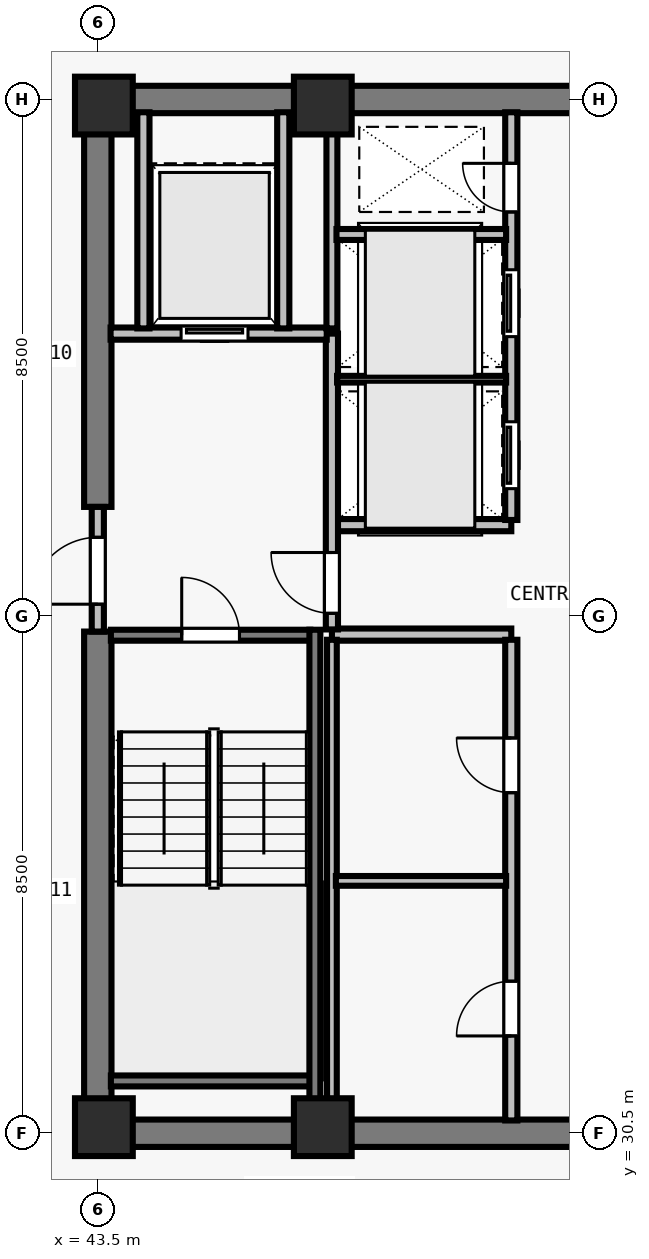
"""IFC4 building model, lengths in metres.
Left out: names, types, materials, properties, quantities, classifications, styles, units other than length and angle.
Written with IfcOpenShell. Run it as: python <this file> out.ifc"""

import sys

from ifc_helpers import new_model, si_unit, direction, frame, frame_2d, origin, origin_2d, place, context, subcontext, project, spatial, rectangle, extrude, element, fill, save


model = new_model("IFC4")
c1 = context("Model", 3, precision=1e-05, world=origin(), true_north=direction((0.0, 1.0)))
c2 = subcontext(c1, "Body", "Model", "MODEL_VIEW")
j1 = project(units=[si_unit("LENGTHUNIT", "METRE"), si_unit("PLANEANGLEUNIT", "RADIAN")], contexts=[c1])
p1 = place(None, origin())
s1 = spatial("IfcSite", under=j1, at=p1, CompositionType="ELEMENT")
p2 = place(p1, origin())
s2 = spatial("IfcBuilding", under=s1, at=p2, CompositionType="ELEMENT")
p3 = place(p2, frame((0.0, 0.0, 213.0)))
s3 = spatial("IfcBuildingStorey", under=s2, at=p3, CompositionType="ELEMENT", Elevation=213.0)
for number, where, z_axis, x_axis in (
    (1, (43.6, 30.6, 0.0), (0.0, 0.0, 1.0), (1.0, 0.0, 0.0)),
    (2, (47.2, 30.6, 0.0), (0.0, 0.0, 1.0), (1.0, 0.0, 0.0)),
    (3, (43.6, 47.4, 0.0), (0.0, 0.0, 1.0), (1.0, 0.0, 0.0)),
    (4, (47.2, 47.4, 0.0), (0.0, 0.0, 1.0), (1.0, 0.0, 0.0)),
):
    element("IfcColumn", number, at=place(p3, frame(where, z_axis=z_axis, x_axis=x_axis)), inside=s3, PredefinedType="COLUMN", context=c2, shape_type="SweptSolid", body=[
        extrude(rectangle(XDim=0.95, YDim=0.95, at=origin_2d()), origin(), (0.0, 0.0, 1.0), 3.5),
    ])
for number, where, z_axis, x_axis in (
    (5, (43.275, 30.5, 0.0), (0.0, 0.0, 1.0), (1.0, 0.0, 0.0)),
    (6, (43.275, 47.5, 0.0), (0.0, 0.0, 1.0), (1.0, 0.0, 0.0)),
):
    element("IfcWall", number, at=place(p3, frame(where, z_axis=z_axis, x_axis=x_axis)), inside=s3, PredefinedType="SHEAR", context=c2, shape_type="SweptSolid", body=[
        extrude(rectangle(XDim=17.45, YDim=0.45, at=frame_2d((8.725, 0.0))), origin(), (0.0, 0.0, 1.0), 3.29),
    ])
p4 = place(p3, frame((43.5, 30.715, 0.0), z_axis=(0.0, 0.0, 1.0), x_axis=(0.0, 1.0, 0.0)))
e7 = element("IfcWall", 7, at=p4, inside=s3, PredefinedType="SHEAR", context=c2, shape_type="SweptSolid", body=[
    extrude(rectangle(XDim=8.035, YDim=0.45, at=frame_2d((4.018, 0.0))), origin(), (0.0, 0.0, 1.0), 3.29),
])
p5 = place(p3, frame((43.5, 40.8, 0.0), z_axis=(0.0, 0.0, 1.0), x_axis=(0.0, 1.0, 0.0)))
e8 = element("IfcWall", 8, at=p5, inside=s3, PredefinedType="SHEAR", context=c2, shape_type="SweptSolid", body=[
    extrude(rectangle(XDim=6.485, YDim=0.45, at=frame_2d((3.242, 0.0))), origin(), (0.0, 0.0, 1.0), 3.29),
])
for number, where, z_axis, x_axis in (
    (9, (47.35, 38.7, 0.0), (0.0, 0.0, 1.0), (1.0, 0.0, 0.0)),
    (10, (47.35, 40.5, 0.0), (0.0, 0.0, 1.0), (1.0, 0.0, 0.0)),
):
    element("IfcWall", number, at=place(p3, frame(where, z_axis=z_axis, x_axis=x_axis)), inside=s3, PredefinedType="SOLIDWALL", context=c2, shape_type="SweptSolid", body=[
        extrude(rectangle(XDim=2.95, YDim=0.2, at=frame_2d((1.475, 0.0))), origin(), (0.0, 0.0, 1.0), 3.29),
    ])
p6 = place(p3, frame((50.3, 30.71, 0.0), z_axis=(0.0, 0.0, 1.0), x_axis=(0.0, 1.0, 0.0)))
e11 = element("IfcWall", 11, at=p6, inside=s3, PredefinedType="SOLIDWALL", context=c2, shape_type="SweptSolid", body=[
    extrude(rectangle(XDim=7.905, YDim=0.2, at=frame_2d((3.953, 0.0))), origin(), (0.0, 0.0, 1.0), 3.29),
])
p7 = place(p6, frame((1.39, 0.0, 0.0)))
e12 = element("IfcOpeningElement", 12, at=p7, cuts=e11, PredefinedType="OPENING", context=c2, shape_type="SweptSolid", body=[
    extrude(rectangle(XDim=0.9, YDim=2.12, at=frame_2d((0.45, 1.06))), frame((0.0, 0.11, 0.0), z_axis=(0.0, -1.0, 0.0), x_axis=(1.0, 0.0, 0.0)), (0.0, 0.0, 1.0), 0.22),
])
p8 = place(p6, frame((5.39, 0.0, 0.0)))
e13 = element("IfcOpeningElement", 13, at=p8, cuts=e11, PredefinedType="OPENING", context=c2, shape_type="SweptSolid", body=[
    extrude(rectangle(XDim=0.9, YDim=2.12, at=frame_2d((0.45, 1.06))), frame((0.0, 0.11, 0.0), z_axis=(0.0, -1.0, 0.0), x_axis=(1.0, 0.0, 0.0)), (0.0, 0.0, 1.0), 0.22),
])
p9 = place(p3, frame((50.3, 40.585, 0.0), z_axis=(0.0, 0.0, 1.0), x_axis=(0.0, 1.0, 0.0)))
e14 = element("IfcWall", 14, at=p9, inside=s3, PredefinedType="SOLIDWALL", context=c2, shape_type="SweptSolid", body=[
    extrude(rectangle(XDim=6.705, YDim=0.2, at=frame_2d((3.353, 0.0))), origin(), (0.0, 0.0, 1.0), 3.29),
])
p10 = place(p9, frame((0.515, 0.0, 0.0)))
e15 = element("IfcOpeningElement", 15, at=p10, cuts=e14, PredefinedType="OPENING", context=c2, shape_type="SweptSolid", body=[
    extrude(rectangle(XDim=1.1, YDim=2.2, at=frame_2d((0.55, 1.1))), frame((0.0, 0.11, 0.0), z_axis=(0.0, -1.0, 0.0), x_axis=(1.0, 0.0, 0.0)), (0.0, 0.0, 1.0), 0.22),
])
p11 = place(p9, frame((3.015, 0.0, 0.0)))
e16 = element("IfcOpeningElement", 16, at=p11, cuts=e14, PredefinedType="OPENING", context=c2, shape_type="SweptSolid", body=[
    extrude(rectangle(XDim=1.1, YDim=2.2, at=frame_2d((0.55, 1.1))), frame((0.0, 0.11, 0.0), z_axis=(0.0, -1.0, 0.0), x_axis=(1.0, 0.0, 0.0)), (0.0, 0.0, 1.0), 0.22),
])
p12 = place(p9, frame((5.065, 0.0, 0.0)))
e17 = element("IfcOpeningElement", 17, at=p12, cuts=e14, PredefinedType="OPENING", context=c2, shape_type="SweptSolid", body=[
    extrude(rectangle(XDim=0.8, YDim=2.08, at=frame_2d((0.4, 1.04))), frame((0.0, 0.11, 0.0), z_axis=(0.0, -1.0, 0.0), x_axis=(1.0, 0.0, 0.0)), (0.0, 0.0, 1.0), 0.22),
])
p13 = place(p3, frame((43.5, 38.75, 0.0), z_axis=(0.0, 0.0, 1.0), x_axis=(0.0, 1.0, 0.0)))
e18 = element("IfcWall", 18, at=p13, inside=s3, PredefinedType="SOLIDWALL", context=c2, shape_type="SweptSolid", body=[
    extrude(rectangle(XDim=2.05, YDim=0.2, at=frame_2d((1.025, 0.0))), origin(), (0.0, 0.0, 1.0), 3.29),
])
p14 = place(p13, frame((0.45, 0.0, 0.0)))
e19 = element("IfcOpeningElement", 19, at=p14, cuts=e18, PredefinedType="OPENING", context=c2, shape_type="SweptSolid", body=[
    extrude(rectangle(XDim=1.1, YDim=2.15, at=frame_2d((0.55, 1.075))), frame((0.0, 0.11, 0.0), z_axis=(0.0, -1.0, 0.0), x_axis=(1.0, 0.0, 0.0)), (0.0, 0.0, 1.0), 0.22),
])
p15 = place(p3, frame((47.35, 38.785, 0.0), z_axis=(0.0, 0.0, 1.0), x_axis=(0.0, 1.0, 0.0)))
e20 = element("IfcWall", 20, at=p15, inside=s3, PredefinedType="SOLIDWALL", context=c2, shape_type="SweptSolid", body=[
    extrude(rectangle(XDim=4.865, YDim=0.2, at=frame_2d((2.433, 0.0))), origin(), (0.0, 0.0, 1.0), 3.29),
])
p16 = place(p15, frame((0.265, 0.0, 0.0)))
e21 = element("IfcOpeningElement", 21, at=p16, cuts=e20, PredefinedType="OPENING", context=c2, shape_type="SweptSolid", body=[
    extrude(rectangle(XDim=1.0, YDim=2.15, at=frame_2d((0.5, 1.075))), frame((0.0, 0.11, 0.0), z_axis=(0.0, -1.0, 0.0), x_axis=(1.0, 0.0, 0.0)), (0.0, 0.0, 1.0), 0.22),
])
p17 = place(p3, frame((43.71, 43.65, 0.0), z_axis=(0.0, 0.0, 1.0), x_axis=(1.0, 0.0, 0.0)))
e22 = element("IfcWall", 22, at=p17, inside=s3, PredefinedType="SOLIDWALL", context=c2, shape_type="SweptSolid", body=[
    extrude(rectangle(XDim=3.555, YDim=0.2, at=frame_2d((1.777, 0.0))), origin(), (0.0, 0.0, 1.0), 3.29),
])
p18 = place(p17, frame((1.16, 0.0, 0.0)))
e23 = element("IfcOpeningElement", 23, at=p18, cuts=e22, PredefinedType="OPENING", context=c2, shape_type="SweptSolid", body=[
    extrude(rectangle(XDim=1.1, YDim=2.2, at=frame_2d((0.55, 1.1))), frame((0.0, 0.11, 0.0), z_axis=(0.0, -1.0, 0.0), x_axis=(1.0, 0.0, 0.0)), (0.0, 0.0, 1.0), 0.22),
])
for number, where, z_axis, x_axis in (
    (24, (46.55, 43.735, 0.0), (0.0, 0.0, 1.0), (0.0, 1.0, 0.0)),
    (25, (44.25, 43.735, 0.0), (0.0, 0.0, 1.0), (0.0, 1.0, 0.0)),
):
    element("IfcWall", number, at=place(p3, frame(where, z_axis=z_axis, x_axis=x_axis)), inside=s3, PredefinedType="SOLIDWALL", context=c2, shape_type="SweptSolid", body=[
        extrude(rectangle(XDim=3.555, YDim=0.2, at=frame_2d((1.777, 0.0))), origin(), (0.0, 0.0, 1.0), 3.29),
    ])
p19 = place(p3, frame((47.35, 30.71, 0.0), z_axis=(0.0, 0.0, 1.0), x_axis=(0.0, 1.0, 0.0)))
e26 = element("IfcWall", 26, at=p19, inside=s3, PredefinedType="PARTITIONING", context=c2, shape_type="SweptSolid", body=[
    extrude(rectangle(XDim=7.905, YDim=0.16, at=frame_2d((3.953, 0.0))), origin(), (0.0, 0.0, 1.0), 3.29),
])
p20 = place(p3, frame((47.415, 34.65, 0.0), z_axis=(0.0, 0.0, 1.0), x_axis=(1.0, 0.0, 0.0)))
e27 = element("IfcWall", 27, at=p20, inside=s3, PredefinedType="PARTITIONING", context=c2, shape_type="SweptSolid", body=[
    extrude(rectangle(XDim=2.8, YDim=0.16, at=frame_2d((1.4, 0.0))), origin(), (0.0, 0.0, 1.0), 3.29),
])
p21 = place(p3, frame((47.35, 43.735, 0.0), z_axis=(0.0, 0.0, 1.0), x_axis=(0.0, 1.0, 0.0)))
e28 = element("IfcWall", 28, at=p21, inside=s3, PredefinedType="SOLIDWALL", context=c2, shape_type="SweptSolid", body=[
    extrude(rectangle(XDim=3.555, YDim=0.18, at=frame_2d((1.777, 0.0))), origin(), (0.0, 0.0, 1.0), 3.29),
])
p22 = place(p3, frame((47.435, 42.9, 0.0), z_axis=(0.0, 0.0, 1.0), x_axis=(1.0, 0.0, 0.0)))
e29 = element("IfcWall", 29, at=p22, inside=s3, PredefinedType="PARTITIONING", context=c2, shape_type="SweptSolid", body=[
    extrude(rectangle(XDim=2.78, YDim=0.11, at=frame_2d((1.39, 0.0))), origin(), (0.0, 0.0, 1.0), 3.29),
])
p23 = place(p3, frame((47.425, 45.28, 0.0), z_axis=(0.0, 0.0, 1.0), x_axis=(1.0, 0.0, 0.0)))
e30 = element("IfcWall", 30, at=p23, inside=s3, PredefinedType="SOLIDWALL", context=c2, shape_type="SweptSolid", body=[
    extrude(rectangle(XDim=2.79, YDim=0.18, at=frame_2d((1.395, 0.0))), origin(), (0.0, 0.0, 1.0), 3.29),
])
p24 = place(p3, frame((43.715, 38.69, 0.0), z_axis=(0.0, 0.0, 1.0), x_axis=(1.0, 0.0, 0.0)))
e31 = element("IfcWall", 31, at=p24, inside=s3, PredefinedType="SOLIDWALL", context=c2, shape_type="SweptSolid", body=[
    extrude(rectangle(XDim=3.28, YDim=0.18, at=frame_2d((1.64, 0.0))), origin(), (0.0, 0.0, 1.0), 3.29),
])
p25 = place(p24, frame((1.165, 0.0, 0.0)))
e32 = element("IfcOpeningElement", 32, at=p25, cuts=e31, PredefinedType="OPENING", context=c2, shape_type="SweptSolid", body=[
    extrude(rectangle(XDim=0.95, YDim=2.15, at=frame_2d((0.475, 1.075))), frame((0.0, 0.1, 0.0), z_axis=(0.0, -1.0, 0.0), x_axis=(1.0, 0.0, 0.0)), (0.0, 0.0, 1.0), 0.2),
])
p26 = place(p3, frame((43.715, 31.36, 0.0), z_axis=(0.0, 0.0, 1.0), x_axis=(1.0, 0.0, 0.0)))
e33 = element("IfcWall", 33, at=p26, inside=s3, PredefinedType="SOLIDWALL", context=c2, shape_type="SweptSolid", body=[
    extrude(rectangle(XDim=3.28, YDim=0.18, at=frame_2d((1.64, 0.0))), origin(), (0.0, 0.0, 1.0), 3.29),
])
p27 = place(p3, frame((47.07, 38.78, 0.0), z_axis=(0.0, 0.0, 1.0), x_axis=(0.0, -1.0, 0.0)))
e34 = element("IfcWall", 34, at=p27, inside=s3, PredefinedType="SOLIDWALL", context=c2, shape_type="SweptSolid", body=[
    extrude(rectangle(XDim=8.067, YDim=0.18, at=frame_2d((4.034, 0.0))), origin(), (0.0, 0.0, 1.0), 3.29),
])
p28 = place(p14, origin())
e35 = element("IfcDoor", 35, at=p28, inside=s3, OperationType="SINGLE_SWING_LEFT", PredefinedType="DOOR", context=c2, shape_type="SweptSolid", body=[
    extrude(rectangle(XDim=1.1, YDim=2.15, at=frame_2d((0.55, 1.075))), frame((0.0, 0.025, 0.0), z_axis=(0.0, -1.0, 0.0), x_axis=(1.0, 0.0, 0.0)), (0.0, 0.0, 1.0), 0.05),
])
fill(e19, e35)
p29 = place(p16, origin())
e36 = element("IfcDoor", 36, at=p29, inside=s3, OperationType="SINGLE_SWING_RIGHT", PredefinedType="DOOR", context=c2, shape_type="SweptSolid", body=[
    extrude(rectangle(XDim=1.0, YDim=2.15, at=frame_2d((0.5, 1.075))), frame((0.0, 0.025, 0.0), z_axis=(0.0, -1.0, 0.0), x_axis=(1.0, 0.0, 0.0)), (0.0, 0.0, 1.0), 0.05),
])
fill(e21, e36)
p30 = place(p18, origin())
e37 = element("IfcDoor", 37, at=p30, inside=s3, OperationType="SLIDING_TO_LEFT", PredefinedType="DOOR", context=c2, shape_type="SweptSolid", body=[
    extrude(rectangle(XDim=1.1, YDim=2.2, at=frame_2d((0.55, 1.1))), frame((0.0, 0.025, 0.0), z_axis=(0.0, -1.0, 0.0), x_axis=(1.0, 0.0, 0.0)), (0.0, 0.0, 1.0), 0.05),
])
fill(e23, e37)
p31 = place(p7, origin())
e38 = element("IfcDoor", 38, at=p31, inside=s3, OperationType="SINGLE_SWING_LEFT", PredefinedType="DOOR", context=c2, shape_type="SweptSolid", body=[
    extrude(rectangle(XDim=0.9, YDim=2.12, at=frame_2d((0.45, 1.06))), frame((0.0, 0.025, 0.0), z_axis=(0.0, -1.0, 0.0), x_axis=(1.0, 0.0, 0.0)), (0.0, 0.0, 1.0), 0.05),
])
fill(e12, e38)
p32 = place(p8, origin())
e39 = element("IfcDoor", 39, at=p32, inside=s3, OperationType="SINGLE_SWING_RIGHT", PredefinedType="DOOR", context=c2, shape_type="SweptSolid", body=[
    extrude(rectangle(XDim=0.9, YDim=2.12, at=frame_2d((0.45, 1.06))), frame((0.0, 0.025, 0.0), z_axis=(0.0, -1.0, 0.0), x_axis=(1.0, 0.0, 0.0)), (0.0, 0.0, 1.0), 0.05),
])
fill(e13, e39)
p33 = place(p10, origin())
e40 = element("IfcDoor", 40, at=p33, inside=s3, OperationType="SLIDING_TO_LEFT", PredefinedType="DOOR", context=c2, shape_type="SweptSolid", body=[
    extrude(rectangle(XDim=1.1, YDim=2.2, at=frame_2d((0.55, 1.1))), frame((0.0, 0.025, 0.0), z_axis=(0.0, -1.0, 0.0), x_axis=(1.0, 0.0, 0.0)), (0.0, 0.0, 1.0), 0.05),
])
fill(e15, e40)
p34 = place(p11, origin())
e41 = element("IfcDoor", 41, at=p34, inside=s3, OperationType="SLIDING_TO_LEFT", PredefinedType="DOOR", context=c2, shape_type="SweptSolid", body=[
    extrude(rectangle(XDim=1.1, YDim=2.2, at=frame_2d((0.55, 1.1))), frame((0.0, 0.025, 0.0), z_axis=(0.0, -1.0, 0.0), x_axis=(1.0, 0.0, 0.0)), (0.0, 0.0, 1.0), 0.05),
])
fill(e16, e41)
p35 = place(p12, origin())
e42 = element("IfcDoor", 42, at=p35, inside=s3, OperationType="SINGLE_SWING_RIGHT", PredefinedType="DOOR", context=c2, shape_type="SweptSolid", body=[
    extrude(rectangle(XDim=0.8, YDim=2.08, at=frame_2d((0.4, 1.04))), frame((0.0, 0.025, 0.0), z_axis=(0.0, -1.0, 0.0), x_axis=(1.0, 0.0, 0.0)), (0.0, 0.0, 1.0), 0.05),
])
fill(e17, e42)
p36 = place(p25, origin())
e43 = element("IfcDoor", 43, at=p36, inside=s3, OperationType="SINGLE_SWING_LEFT", PredefinedType="DOOR", context=c2, shape_type="SweptSolid", body=[
    extrude(rectangle(XDim=0.95, YDim=2.15, at=frame_2d((0.475, 1.075))), frame((0.0, 0.025, 0.0), z_axis=(0.0, -1.0, 0.0), x_axis=(1.0, 0.0, 0.0)), (0.0, 0.0, 1.0), 0.05),
])
fill(e32, e43)
save(model, sys.argv[1])
